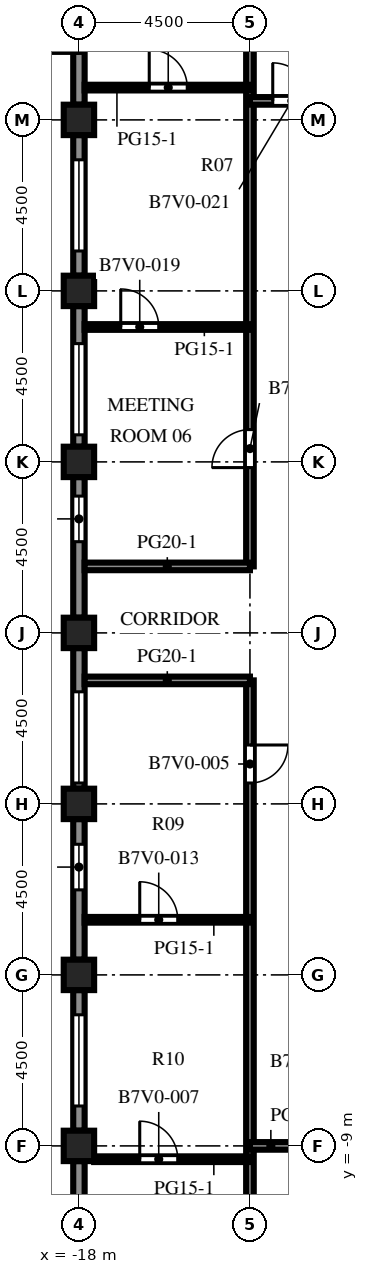
"""IFC4 building model, lengths in metres.
Left out: names, types, materials, properties, quantities, classifications, styles, units other than length and angle.
Written with IfcOpenShell. Run it as: python <this file> out.ifc"""

import sys

from ifc_helpers import new_model, si_unit, direction, frame, frame_2d, origin, origin_2d, place, context, subcontext, project, spatial, rectangle, extrude, element, fill, save


model = new_model("IFC4")
c1 = context("Model", 3, precision=1e-05, world=origin(), true_north=direction((0.0, 1.0)))
c2 = subcontext(c1, "Body", "Model", "MODEL_VIEW")
j1 = project(units=[si_unit("LENGTHUNIT", "METRE"), si_unit("PLANEANGLEUNIT", "RADIAN")], contexts=[c1])
p1 = place(None, origin())
s1 = spatial("IfcSite", under=j1, at=p1, CompositionType="ELEMENT")
p2 = place(p1, origin())
s2 = spatial("IfcBuilding", under=s1, at=p2, CompositionType="ELEMENT")
p3 = place(p2, frame((0.0, 0.0, 235.7)))
s3 = spatial("IfcBuildingStorey", under=s2, at=p3, CompositionType="ELEMENT", Elevation=235.7)
for number, where, z_axis, x_axis in (
    (1, (-18.0, -9.0, 0.0), (0.0, 0.0, 1.0), (1.0, 0.0, 0.0)),
    (2, (-18.0, -4.5, 0.0), (0.0, 0.0, 1.0), (1.0, 0.0, 0.0)),
    (3, (-18.0, 0.0, 0.0), (0.0, 0.0, 1.0), (1.0, 0.0, 0.0)),
    (4, (-18.0, 4.5, 0.0), (0.0, 0.0, 1.0), (1.0, 0.0, 0.0)),
    (5, (-18.0, 9.0, 0.0), (0.0, 0.0, 1.0), (1.0, 0.0, 0.0)),
    (6, (-18.0, 13.5, 0.0), (0.0, 0.0, 1.0), (1.0, 0.0, 0.0)),
    (7, (-18.0, 18.0, 0.0), (0.0, 0.0, 1.0), (1.0, 0.0, 0.0)),
):
    element("IfcColumn", number, at=place(p3, frame(where, z_axis=z_axis, x_axis=x_axis)), inside=s3, PredefinedType="COLUMN", context=c2, shape_type="SweptSolid", body=[
        extrude(rectangle(XDim=0.8, YDim=0.8, at=origin_2d()), origin(), (0.0, 0.0, 1.0), 4.1),
    ])
p4 = place(p3, frame((-18.0, 18.4, 0.0), z_axis=(0.0, 0.0, 1.0), x_axis=(0.0, 1.0, 0.0)))
e8 = element("IfcWall", 8, at=p4, inside=s3, PredefinedType="SOLIDWALL", context=c2, shape_type="SweptSolid", body=[
    extrude(rectangle(XDim=3.7, YDim=0.3, at=frame_2d((1.85, 0.0))), origin(), (0.0, 0.0, 1.0), 2.85),
])
p5 = place(p4, frame((1.35, 0.0, 0.0)))
e9 = element("IfcOpeningElement", 9, at=p5, cuts=e8, PredefinedType="OPENING", context=c2, shape_type="SweptSolid", body=[
    extrude(rectangle(XDim=1.0, YDim=2.2, at=frame_2d((0.5, 1.1))), frame((0.0, 0.16, 0.0), z_axis=(0.0, -1.0, 0.0), x_axis=(1.0, 0.0, 0.0)), (0.0, 0.0, 1.0), 0.32),
])
p6 = place(p3, frame((-18.0, 13.9, 0.0), z_axis=(0.0, 0.0, 1.0), x_axis=(0.0, 1.0, 0.0)))
e10 = element("IfcWall", 10, at=p6, inside=s3, PredefinedType="SOLIDWALL", context=c2, shape_type="SweptSolid", body=[
    extrude(rectangle(XDim=3.7, YDim=0.3, at=frame_2d((1.85, 0.0))), origin(), (0.0, 0.0, 1.0), 2.85),
])
p7 = place(p6, frame((0.65, 0.0, 0.8)))
e11 = element("IfcOpeningElement", 11, at=p7, cuts=e10, PredefinedType="OPENING", context=c2, shape_type="SweptSolid", body=[
    extrude(rectangle(XDim=2.4, YDim=1.7, at=frame_2d((1.2, 0.85))), frame((0.0, 0.16, 0.0), z_axis=(0.0, -1.0, 0.0), x_axis=(1.0, 0.0, 0.0)), (0.0, 0.0, 1.0), 0.32),
])
p8 = place(p3, frame((-18.0, 9.4, 0.0), z_axis=(0.0, 0.0, 1.0), x_axis=(0.0, 1.0, 0.0)))
e12 = element("IfcWall", 12, at=p8, inside=s3, PredefinedType="SOLIDWALL", context=c2, shape_type="SweptSolid", body=[
    extrude(rectangle(XDim=3.7, YDim=0.3, at=frame_2d((1.85, 0.0))), origin(), (0.0, 0.0, 1.0), 2.85),
])
p9 = place(p8, frame((0.312, 0.0, 0.8)))
e13 = element("IfcOpeningElement", 13, at=p9, cuts=e12, PredefinedType="OPENING", context=c2, shape_type="SweptSolid", body=[
    extrude(rectangle(XDim=2.4, YDim=1.7, at=frame_2d((1.2, 0.85))), frame((0.0, 0.16, 0.0), z_axis=(0.0, -1.0, 0.0), x_axis=(1.0, 0.0, 0.0)), (0.0, 0.0, 1.0), 0.32),
])
p10 = place(p3, frame((-18.0, 4.9, 0.0), z_axis=(0.0, 0.0, 1.0), x_axis=(0.0, 1.0, 0.0)))
e14 = element("IfcWall", 14, at=p10, inside=s3, PredefinedType="SOLIDWALL", context=c2, shape_type="SweptSolid", body=[
    extrude(rectangle(XDim=3.7, YDim=0.3, at=frame_2d((1.85, 0.0))), origin(), (0.0, 0.0, 1.0), 2.85),
])
p11 = place(p10, frame((2.0, 0.0, 0.8)))
e15 = element("IfcOpeningElement", 15, at=p11, cuts=e14, PredefinedType="OPENING", context=c2, shape_type="SweptSolid", body=[
    extrude(rectangle(XDim=1.2, YDim=1.7, at=frame_2d((0.6, 0.85))), frame((0.0, 0.16, 0.0), z_axis=(0.0, -1.0, 0.0), x_axis=(1.0, 0.0, 0.0)), (0.0, 0.0, 1.0), 0.32),
])
p12 = place(p3, frame((-18.0, 0.4, 0.0), z_axis=(0.0, 0.0, 1.0), x_axis=(0.0, 1.0, 0.0)))
e16 = element("IfcWall", 16, at=p12, inside=s3, PredefinedType="SOLIDWALL", context=c2, shape_type="SweptSolid", body=[
    extrude(rectangle(XDim=3.7, YDim=0.3, at=frame_2d((1.85, 0.0))), origin(), (0.0, 0.0, 1.0), 2.85),
])
p13 = place(p12, frame((0.15, 0.0, 0.8)))
e17 = element("IfcOpeningElement", 17, at=p13, cuts=e16, PredefinedType="OPENING", context=c2, shape_type="SweptSolid", body=[
    extrude(rectangle(XDim=2.4, YDim=1.7, at=frame_2d((1.2, 0.85))), frame((0.0, 0.16, 0.0), z_axis=(0.0, -1.0, 0.0), x_axis=(1.0, 0.0, 0.0)), (0.0, 0.0, 1.0), 0.32),
])
p14 = place(p3, frame((-18.0, -4.1, 0.0), z_axis=(0.0, 0.0, 1.0), x_axis=(0.0, 1.0, 0.0)))
e18 = element("IfcWall", 18, at=p14, inside=s3, PredefinedType="SOLIDWALL", context=c2, shape_type="SweptSolid", body=[
    extrude(rectangle(XDim=3.7, YDim=0.3, at=frame_2d((1.85, 0.0))), origin(), (0.0, 0.0, 1.0), 2.85),
])
p15 = place(p14, frame((1.837, 0.0, 0.8)))
e19 = element("IfcOpeningElement", 19, at=p15, cuts=e18, PredefinedType="OPENING", context=c2, shape_type="SweptSolid", body=[
    extrude(rectangle(XDim=1.2, YDim=1.7, at=frame_2d((0.6, 0.85))), frame((0.0, 0.16, 0.0), z_axis=(0.0, -1.0, 0.0), x_axis=(1.0, 0.0, 0.0)), (0.0, 0.0, 1.0), 0.32),
])
p16 = place(p3, frame((-18.0, -8.6, 0.0), z_axis=(0.0, 0.0, 1.0), x_axis=(0.0, 1.0, 0.0)))
e20 = element("IfcWall", 20, at=p16, inside=s3, PredefinedType="SOLIDWALL", context=c2, shape_type="SweptSolid", body=[
    extrude(rectangle(XDim=3.7, YDim=0.3, at=frame_2d((1.85, 0.0))), origin(), (0.0, 0.0, 1.0), 2.85),
])
p17 = place(p16, frame((0.65, 0.0, 0.8)))
e21 = element("IfcOpeningElement", 21, at=p17, cuts=e20, PredefinedType="OPENING", context=c2, shape_type="SweptSolid", body=[
    extrude(rectangle(XDim=2.4, YDim=1.7, at=frame_2d((1.2, 0.85))), frame((0.0, 0.16, 0.0), z_axis=(0.0, -1.0, 0.0), x_axis=(1.0, 0.0, 0.0)), (0.0, 0.0, 1.0), 0.32),
])
p18 = place(p3, frame((-18.0, -13.1, 0.0), z_axis=(0.0, 0.0, 1.0), x_axis=(0.0, 1.0, 0.0)))
e22 = element("IfcWall", 22, at=p18, inside=s3, PredefinedType="SOLIDWALL", context=c2, shape_type="SweptSolid", body=[
    extrude(rectangle(XDim=3.7, YDim=0.3, at=frame_2d((1.85, 0.0))), origin(), (0.0, 0.0, 1.0), 2.85),
])
p19 = place(p18, frame((1.35, 0.0, 0.0)))
e23 = element("IfcOpeningElement", 23, at=p19, cuts=e22, PredefinedType="OPENING", context=c2, shape_type="SweptSolid", body=[
    extrude(rectangle(XDim=1.0, YDim=2.2, at=frame_2d((0.5, 1.1))), frame((0.0, 0.16, 0.0), z_axis=(0.0, -1.0, 0.0), x_axis=(1.0, 0.0, 0.0)), (0.0, 0.0, 1.0), 0.32),
])
p20 = place(p3, frame((-13.5, -22.077, 0.0), z_axis=(0.0, 0.0, 1.0), x_axis=(0.0, 1.0, 0.0)))
e24 = element("IfcWall", 24, at=p20, inside=s3, PredefinedType="PARTITIONING", context=c2, shape_type="SweptSolid", body=[
    extrude(rectangle(XDim=25.327, YDim=0.2, at=frame_2d((12.664, 0.0))), origin(), (0.0, 0.0, 1.0), 3.65),
])
p21 = place(p20, frame((22.627, 0.0, 0.0)))
e25 = element("IfcOpeningElement", 25, at=p21, cuts=e24, PredefinedType="OPENING", context=c2, shape_type="SweptSolid", body=[
    extrude(rectangle(XDim=1.0, YDim=2.1, at=frame_2d((0.5, 1.05))), frame((0.0, 0.11, 0.0), z_axis=(0.0, -1.0, 0.0), x_axis=(1.0, 0.0, 0.0)), (0.0, 0.0, 1.0), 0.22),
])
p22 = place(p3, frame((-13.5, 6.25, 0.0), z_axis=(0.0, 0.0, 1.0), x_axis=(0.0, 1.0, 0.0)))
e26 = element("IfcWall", 26, at=p22, inside=s3, PredefinedType="PARTITIONING", context=c2, shape_type="SweptSolid", body=[
    extrude(rectangle(XDim=24.827, YDim=0.2, at=frame_2d((12.414, 0.0))), origin(), (0.0, 0.0, 1.0), 3.65),
])
p23 = place(p22, frame((2.6, 0.0, 0.0)))
e27 = element("IfcOpeningElement", 27, at=p23, cuts=e26, PredefinedType="OPENING", context=c2, shape_type="SweptSolid", body=[
    extrude(rectangle(XDim=1.0, YDim=2.1, at=frame_2d((0.5, 1.05))), frame((0.0, 0.11, 0.0), z_axis=(0.0, -1.0, 0.0), x_axis=(1.0, 0.0, 0.0)), (0.0, 0.0, 1.0), 0.22),
])
p24 = place(p3, frame((-13.5, -9.35, 0.0), z_axis=(0.0, 0.0, 1.0), x_axis=(-1.0, 0.0, 0.0)))
e28 = element("IfcWall", 28, at=p24, inside=s3, PredefinedType="PARTITIONING", context=c2, shape_type="SweptSolid", body=[
    extrude(rectangle(XDim=4.1, YDim=0.15, at=frame_2d((2.05, 0.0))), origin(), (0.0, 0.0, 1.0), 3.65),
])
p25 = place(p24, frame((1.9, 0.0, 0.0)))
e29 = element("IfcOpeningElement", 29, at=p25, cuts=e28, PredefinedType="OPENING", context=c2, shape_type="SweptSolid", body=[
    extrude(rectangle(XDim=1.0, YDim=2.1, at=frame_2d((0.5, 1.05))), frame((0.0, 0.085, 0.0), z_axis=(0.0, -1.0, 0.0), x_axis=(1.0, 0.0, 0.0)), (0.0, 0.0, 1.0), 0.17),
])
p26 = place(p3, frame((-10.5, -9.0, 0.0), z_axis=(0.0, 0.0, 1.0), x_axis=(-1.0, 0.0, 0.0)))
e30 = element("IfcWall", 30, at=p26, inside=s3, PredefinedType="PARTITIONING", context=c2, shape_type="SweptSolid", body=[
    extrude(rectangle(XDim=3.0, YDim=0.2, at=frame_2d((1.5, 0.0))), origin(), (0.0, 0.0, 1.0), 3.65),
])
p27 = place(p26, frame((0.9, 0.0, 0.0)))
e31 = element("IfcOpeningElement", 31, at=p27, cuts=e30, PredefinedType="OPENING", context=c2, shape_type="SweptSolid", body=[
    extrude(rectangle(XDim=1.0, YDim=2.1, at=frame_2d((0.5, 1.05))), frame((0.0, 0.11, 0.0), z_axis=(0.0, -1.0, 0.0), x_axis=(1.0, 0.0, 0.0)), (0.0, 0.0, 1.0), 0.22),
])
p28 = place(p3, frame((-13.5, -3.05, 0.0), z_axis=(0.0, 0.0, 1.0), x_axis=(-1.0, 0.0, 0.0)))
e32 = element("IfcWall", 32, at=p28, inside=s3, PredefinedType="PARTITIONING", context=c2, shape_type="SweptSolid", body=[
    extrude(rectangle(XDim=4.35, YDim=0.15, at=frame_2d((2.175, 0.0))), origin(), (0.0, 0.0, 1.0), 3.65),
])
p29 = place(p28, frame((1.9, 0.0, 0.0)))
e33 = element("IfcOpeningElement", 33, at=p29, cuts=e32, PredefinedType="OPENING", context=c2, shape_type="SweptSolid", body=[
    extrude(rectangle(XDim=1.0, YDim=2.1, at=frame_2d((0.5, 1.05))), frame((0.0, 0.085, 0.0), z_axis=(0.0, -1.0, 0.0), x_axis=(1.0, 0.0, 0.0)), (0.0, 0.0, 1.0), 0.17),
])
for number, where, z_axis, x_axis in (
    (34, (-17.85, 3.25, 0.0), (0.0, 0.0, 1.0), (1.0, 0.0, 0.0)),
    (35, (-17.85, 6.25, 0.0), (0.0, 0.0, 1.0), (1.0, 0.0, 0.0)),
):
    element("IfcWall", number, at=place(p3, frame(where, z_axis=z_axis, x_axis=x_axis)), inside=s3, PredefinedType="PARTITIONING", context=c2, shape_type="SweptSolid", body=[
        extrude(rectangle(XDim=4.35, YDim=0.2, at=frame_2d((2.175, 0.0))), origin(), (0.0, 0.0, 1.0), 3.65),
    ])
p30 = place(p3, frame((-17.85, 12.55, 0.0), z_axis=(0.0, 0.0, 1.0), x_axis=(1.0, 0.0, 0.0)))
e36 = element("IfcWall", 36, at=p30, inside=s3, PredefinedType="PARTITIONING", context=c2, shape_type="SweptSolid", body=[
    extrude(rectangle(XDim=4.35, YDim=0.15, at=frame_2d((2.175, 0.0))), origin(), (0.0, 0.0, 1.0), 3.65),
])
p31 = place(p30, frame((0.95, 0.0, 0.0)))
e37 = element("IfcOpeningElement", 37, at=p31, cuts=e36, PredefinedType="OPENING", context=c2, shape_type="SweptSolid", body=[
    extrude(rectangle(XDim=1.0, YDim=2.1, at=frame_2d((0.5, 1.05))), frame((0.0, 0.085, 0.0), z_axis=(0.0, -1.0, 0.0), x_axis=(1.0, 0.0, 0.0)), (0.0, 0.0, 1.0), 0.17),
])
p32 = place(p3, frame((-13.5, 18.5, 0.0), z_axis=(0.0, 0.0, 1.0), x_axis=(1.0, 0.0, 0.0)))
e38 = element("IfcWall", 38, at=p32, inside=s3, PredefinedType="PARTITIONING", context=c2, shape_type="SweptSolid", body=[
    extrude(rectangle(XDim=3.0, YDim=0.2, at=frame_2d((1.5, 0.0))), origin(), (0.0, 0.0, 1.0), 3.65),
])
p33 = place(p32, frame((0.6, 0.0, 0.0)))
e39 = element("IfcOpeningElement", 39, at=p33, cuts=e38, PredefinedType="OPENING", context=c2, shape_type="SweptSolid", body=[
    extrude(rectangle(XDim=1.0, YDim=2.1, at=frame_2d((0.5, 1.05))), frame((0.0, 0.11, 0.0), z_axis=(0.0, -1.0, 0.0), x_axis=(1.0, 0.0, 0.0)), (0.0, 0.0, 1.0), 0.22),
])
p34 = place(p3, frame((-17.85, 18.85, 0.0), z_axis=(0.0, 0.0, 1.0), x_axis=(1.0, 0.0, 0.0)))
e40 = element("IfcWall", 40, at=p34, inside=s3, PredefinedType="PARTITIONING", context=c2, shape_type="SweptSolid", body=[
    extrude(rectangle(XDim=4.35, YDim=0.15, at=frame_2d((2.175, 0.0))), origin(), (0.0, 0.0, 1.0), 3.65),
])
p35 = place(p34, frame((1.7, 0.0, 0.0)))
e41 = element("IfcOpeningElement", 41, at=p35, cuts=e40, PredefinedType="OPENING", context=c2, shape_type="SweptSolid", body=[
    extrude(rectangle(XDim=1.0, YDim=2.1, at=frame_2d((0.5, 1.05))), frame((0.0, 0.085, 0.0), z_axis=(0.0, -1.0, 0.0), x_axis=(1.0, 0.0, 0.0)), (0.0, 0.0, 1.0), 0.17),
])
p36 = place(p5, origin())
e42 = element("IfcDoor", 42, at=p36, inside=s3, OperationType="SINGLE_SWING_LEFT", PredefinedType="DOOR", context=c2, shape_type="SweptSolid", body=[
    extrude(rectangle(XDim=1.0, YDim=2.2, at=frame_2d((0.5, 1.1))), frame((0.0, 0.025, 0.0), z_axis=(0.0, -1.0, 0.0), x_axis=(1.0, 0.0, 0.0)), (0.0, 0.0, 1.0), 0.05),
])
fill(e9, e42)
p37 = place(p7, origin())
e43 = element("IfcWindow", 43, at=p37, inside=s3, PartitioningType="SINGLE_PANEL", PredefinedType="WINDOW", context=c2, shape_type="SweptSolid", body=[
    extrude(rectangle(XDim=2.4, YDim=1.7, at=frame_2d((1.2, 0.85))), frame((0.0, 0.03, 0.0), z_axis=(0.0, -1.0, 0.0), x_axis=(1.0, 0.0, 0.0)), (0.0, 0.0, 1.0), 0.06),
])
fill(e11, e43)
p38 = place(p9, origin())
e44 = element("IfcWindow", 44, at=p38, inside=s3, PartitioningType="SINGLE_PANEL", PredefinedType="WINDOW", context=c2, shape_type="SweptSolid", body=[
    extrude(rectangle(XDim=2.4, YDim=1.7, at=frame_2d((1.2, 0.85))), frame((0.0, 0.03, 0.0), z_axis=(0.0, -1.0, 0.0), x_axis=(1.0, 0.0, 0.0)), (0.0, 0.0, 1.0), 0.06),
])
fill(e13, e44)
p39 = place(p11, origin())
e45 = element("IfcWindow", 45, at=p39, inside=s3, PartitioningType="SINGLE_PANEL", PredefinedType="WINDOW", context=c2, shape_type="SweptSolid", body=[
    extrude(rectangle(XDim=1.2, YDim=1.7, at=frame_2d((0.6, 0.85))), frame((0.0, 0.03, 0.0), z_axis=(0.0, -1.0, 0.0), x_axis=(1.0, 0.0, 0.0)), (0.0, 0.0, 1.0), 0.06),
])
fill(e15, e45)
p40 = place(p13, origin())
e46 = element("IfcWindow", 46, at=p40, inside=s3, PartitioningType="SINGLE_PANEL", PredefinedType="WINDOW", context=c2, shape_type="SweptSolid", body=[
    extrude(rectangle(XDim=2.4, YDim=1.7, at=frame_2d((1.2, 0.85))), frame((0.0, 0.03, 0.0), z_axis=(0.0, -1.0, 0.0), x_axis=(1.0, 0.0, 0.0)), (0.0, 0.0, 1.0), 0.06),
])
fill(e17, e46)
p41 = place(p15, origin())
e47 = element("IfcWindow", 47, at=p41, inside=s3, PartitioningType="SINGLE_PANEL", PredefinedType="WINDOW", context=c2, shape_type="SweptSolid", body=[
    extrude(rectangle(XDim=1.2, YDim=1.7, at=frame_2d((0.6, 0.85))), frame((0.0, 0.03, 0.0), z_axis=(0.0, -1.0, 0.0), x_axis=(1.0, 0.0, 0.0)), (0.0, 0.0, 1.0), 0.06),
])
fill(e19, e47)
p42 = place(p17, origin())
e48 = element("IfcWindow", 48, at=p42, inside=s3, PartitioningType="SINGLE_PANEL", PredefinedType="WINDOW", context=c2, shape_type="SweptSolid", body=[
    extrude(rectangle(XDim=2.4, YDim=1.7, at=frame_2d((1.2, 0.85))), frame((0.0, 0.03, 0.0), z_axis=(0.0, -1.0, 0.0), x_axis=(1.0, 0.0, 0.0)), (0.0, 0.0, 1.0), 0.06),
])
fill(e21, e48)
p43 = place(p21, origin())
e49 = element("IfcDoor", 49, at=p43, inside=s3, OperationType="SINGLE_SWING_RIGHT", PredefinedType="DOOR", context=c2, shape_type="SweptSolid", body=[
    extrude(rectangle(XDim=1.0, YDim=2.1, at=frame_2d((0.5, 1.05))), frame((0.0, 0.025, 0.0), z_axis=(0.0, -1.0, 0.0), x_axis=(1.0, 0.0, 0.0)), (0.0, 0.0, 1.0), 0.05),
])
fill(e25, e49)
p44 = place(p23, origin())
e50 = element("IfcDoor", 50, at=p44, inside=s3, OperationType="SINGLE_SWING_LEFT", PredefinedType="DOOR", context=c2, shape_type="SweptSolid", body=[
    extrude(rectangle(XDim=1.0, YDim=2.1, at=frame_2d((0.5, 1.05))), frame((0.0, 0.025, 0.0), z_axis=(0.0, -1.0, 0.0), x_axis=(1.0, 0.0, 0.0)), (0.0, 0.0, 1.0), 0.05),
])
fill(e27, e50)
p45 = place(p25, origin())
e51 = element("IfcDoor", 51, at=p45, inside=s3, OperationType="SINGLE_SWING_RIGHT", PredefinedType="DOOR", context=c2, shape_type="SweptSolid", body=[
    extrude(rectangle(XDim=1.0, YDim=2.1, at=frame_2d((0.5, 1.05))), frame((0.0, 0.025, 0.0), z_axis=(0.0, -1.0, 0.0), x_axis=(1.0, 0.0, 0.0)), (0.0, 0.0, 1.0), 0.05),
])
fill(e29, e51)
p46 = place(p29, origin())
e52 = element("IfcDoor", 52, at=p46, inside=s3, OperationType="SINGLE_SWING_RIGHT", PredefinedType="DOOR", context=c2, shape_type="SweptSolid", body=[
    extrude(rectangle(XDim=1.0, YDim=2.1, at=frame_2d((0.5, 1.05))), frame((0.0, 0.025, 0.0), z_axis=(0.0, -1.0, 0.0), x_axis=(1.0, 0.0, 0.0)), (0.0, 0.0, 1.0), 0.05),
])
fill(e33, e52)
p47 = place(p31, origin())
e53 = element("IfcDoor", 53, at=p47, inside=s3, OperationType="SINGLE_SWING_LEFT", PredefinedType="DOOR", context=c2, shape_type="SweptSolid", body=[
    extrude(rectangle(XDim=1.0, YDim=2.1, at=frame_2d((0.5, 1.05))), frame((0.0, 0.025, 0.0), z_axis=(0.0, -1.0, 0.0), x_axis=(1.0, 0.0, 0.0)), (0.0, 0.0, 1.0), 0.05),
])
fill(e37, e53)
p48 = place(p33, origin())
e54 = element("IfcDoor", 54, at=p48, inside=s3, OperationType="SINGLE_SWING_LEFT", PredefinedType="DOOR", context=c2, shape_type="SweptSolid", body=[
    extrude(rectangle(XDim=1.0, YDim=2.1, at=frame_2d((0.5, 1.05))), frame((0.0, 0.025, 0.0), z_axis=(0.0, -1.0, 0.0), x_axis=(1.0, 0.0, 0.0)), (0.0, 0.0, 1.0), 0.05),
])
fill(e39, e54)
p49 = place(p35, origin())
e55 = element("IfcDoor", 55, at=p49, inside=s3, OperationType="SINGLE_SWING_LEFT", PredefinedType="DOOR", context=c2, shape_type="SweptSolid", body=[
    extrude(rectangle(XDim=1.0, YDim=2.1, at=frame_2d((0.5, 1.05))), frame((0.0, 0.025, 0.0), z_axis=(0.0, -1.0, 0.0), x_axis=(1.0, 0.0, 0.0)), (0.0, 0.0, 1.0), 0.05),
])
fill(e41, e55)
save(model, sys.argv[1])
